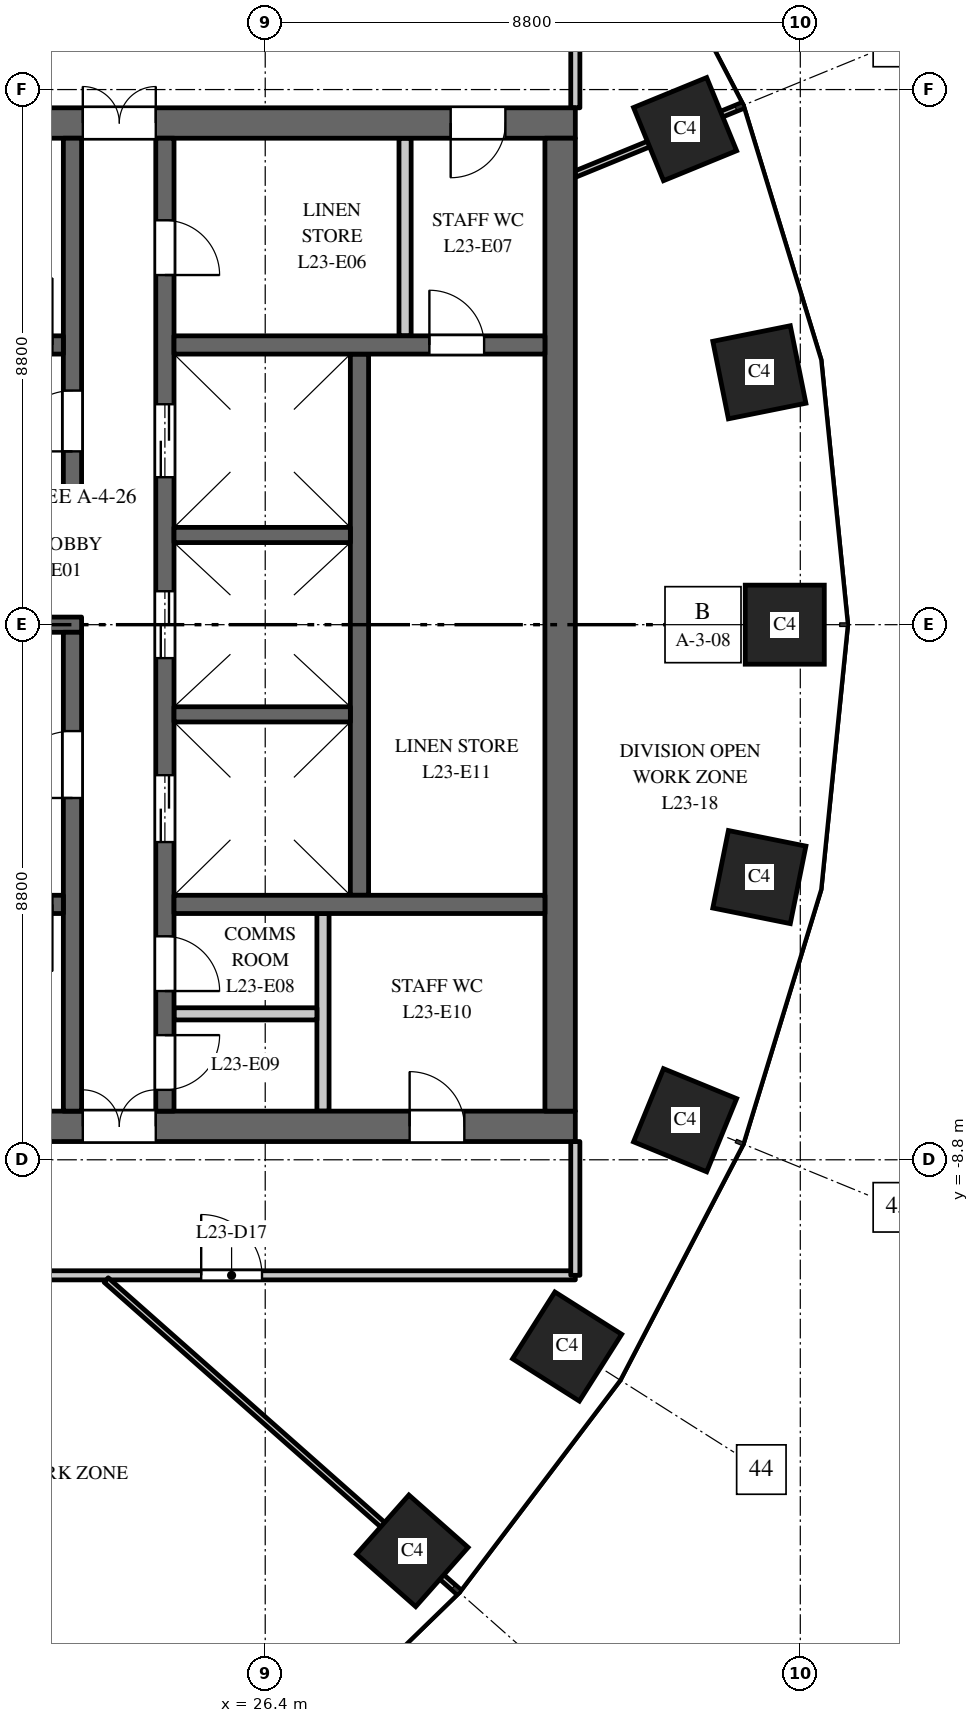
"""IFC4 building model, lengths in metres.
Left out: names, types, materials, properties, quantities, classifications, styles, units other than length and angle.
Written with IfcOpenShell. Run it as: python <this file> out.ifc"""

import sys

from ifc_helpers import new_model, si_unit, direction, frame, frame_2d, origin, origin_2d, place, context, subcontext, project, spatial, rectangle, extrude, element, fill, save


model = new_model("IFC4")
c1 = context("Model", 3, precision=1e-05, world=origin(), true_north=direction((0.0, 1.0)))
c2 = subcontext(c1, "Body", "Model", "MODEL_VIEW")
j1 = project(units=[si_unit("LENGTHUNIT", "METRE"), si_unit("PLANEANGLEUNIT", "RADIAN")], contexts=[c1])
p1 = place(None, origin())
s1 = spatial("IfcSite", under=j1, at=p1, CompositionType="ELEMENT")
p2 = place(p1, origin())
s2 = spatial("IfcBuilding", under=s1, at=p2, CompositionType="ELEMENT")
p3 = place(p2, frame((0.0, 0.0, 104.0)))
s3 = spatial("IfcBuildingStorey", under=s2, at=p3, CompositionType="ELEMENT", Elevation=104.0)
for number, where, z_axis, x_axis in (
    (1, (34.945, 0.0, 0.0), (0.0, 0.0, 1.0), (0.0, 1.0, 0.0)),
    (2, (34.527, 4.151, 0.0), (0.0, 0.0, 1.0), (-0.197, 0.98, 0.0)),
    (3, (33.305, 8.149, 0.0), (0.0, 0.0, 1.0), (-0.379, 0.925, 0.0)),
    (4, (28.819, -15.23, 0.0), (0.0, 0.0, 1.0), (0.663, 0.749, 0.0)),
    (5, (31.365, -11.871, 0.0), (0.0, 0.0, 1.0), (0.535, 0.845, 0.0)),
    (6, (33.305, -8.149, 0.0), (0.0, 0.0, 1.0), (0.379, 0.925, 0.0)),
    (7, (34.527, -4.151, 0.0), (0.0, 0.0, 1.0), (0.197, 0.98, 0.0)),
):
    element("IfcColumn", number, at=place(p3, frame(where, z_axis=z_axis, x_axis=x_axis)), inside=s3, PredefinedType="COLUMN", context=c2, shape_type="SweptSolid", body=[
        extrude(rectangle(XDim=1.3, YDim=1.3, at=origin_2d()), origin(), (0.0, 0.0, 1.0), 4.0),
    ])
p4 = place(p3, frame((16.5, 8.25, 0.0), z_axis=(0.0, 0.0, 1.0), x_axis=(1.0, 0.0, 0.0)))
e8 = element("IfcWall", 8, at=p4, inside=s3, PredefinedType="SHEAR", context=c2, shape_type="SweptSolid", body=[
    extrude(rectangle(XDim=15.0, YDim=0.5, at=frame_2d((7.5, 0.0))), origin(), (0.0, 0.0, 1.0), 3.7),
])
p5 = place(p4, frame((6.9, 0.0, 0.0)))
e9 = element("IfcOpeningElement", 9, at=p5, cuts=e8, PredefinedType="OPENING", context=c2, shape_type="SweptSolid", body=[
    extrude(rectangle(XDim=1.2, YDim=2.1, at=frame_2d((0.6, 1.05))), frame((0.0, 0.26, 0.0), z_axis=(0.0, -1.0, 0.0), x_axis=(1.0, 0.0, 0.0)), (0.0, 0.0, 1.0), 0.52),
])
p6 = place(p4, frame((12.95, 0.0, 0.0)))
e10 = element("IfcOpeningElement", 10, at=p6, cuts=e8, PredefinedType="OPENING", context=c2, shape_type="SweptSolid", body=[
    extrude(rectangle(XDim=0.9, YDim=2.1, at=frame_2d((0.45, 1.05))), frame((0.0, 0.26, 0.0), z_axis=(0.0, -1.0, 0.0), x_axis=(1.0, 0.0, 0.0)), (0.0, 0.0, 1.0), 0.52),
])
p7 = place(p3, frame((16.5, -8.25, 0.0), z_axis=(0.0, 0.0, 1.0), x_axis=(1.0, 0.0, 0.0)))
e11 = element("IfcWall", 11, at=p7, inside=s3, PredefinedType="SHEAR", context=c2, shape_type="SweptSolid", body=[
    extrude(rectangle(XDim=15.0, YDim=0.5, at=frame_2d((7.5, 0.0))), origin(), (0.0, 0.0, 1.0), 3.7),
])
p8 = place(p7, frame((6.9, 0.0, 0.0)))
e12 = element("IfcOpeningElement", 12, at=p8, cuts=e11, PredefinedType="OPENING", context=c2, shape_type="SweptSolid", body=[
    extrude(rectangle(XDim=1.2, YDim=2.1, at=frame_2d((0.6, 1.05))), frame((0.0, 0.26, 0.0), z_axis=(0.0, -1.0, 0.0), x_axis=(1.0, 0.0, 0.0)), (0.0, 0.0, 1.0), 0.52),
])
p9 = place(p7, frame((12.275, 0.0, 0.0)))
e13 = element("IfcOpeningElement", 13, at=p9, cuts=e11, PredefinedType="OPENING", context=c2, shape_type="SweptSolid", body=[
    extrude(rectangle(XDim=0.9, YDim=2.1, at=frame_2d((0.45, 1.05))), frame((0.0, 0.26, 0.0), z_axis=(0.0, -1.0, 0.0), x_axis=(1.0, 0.0, 0.0)), (0.0, 0.0, 1.0), 0.52),
])
p10 = place(p3, frame((27.95, -4.45, 0.0), z_axis=(0.0, 0.0, 1.0), x_axis=(0.0, 1.0, 0.0)))
e14 = element("IfcWall", 14, at=p10, inside=s3, PredefinedType="SHEAR", context=c2, shape_type="SweptSolid", body=[
    extrude(rectangle(XDim=8.9, YDim=0.3, at=frame_2d((4.45, 0.0))), origin(), (0.0, 0.0, 1.0), 3.7),
])
p11 = place(p3, frame((24.75, -8.0, 0.0), z_axis=(0.0, 0.0, 1.0), x_axis=(0.0, 1.0, 0.0)))
e15 = element("IfcWall", 15, at=p11, inside=s3, PredefinedType="SHEAR", context=c2, shape_type="SweptSolid", body=[
    extrude(rectangle(XDim=16.0, YDim=0.3, at=frame_2d((8.0, 0.0))), origin(), (0.0, 0.0, 1.0), 3.7),
])
p12 = place(p11, frame((4.425, 0.0, 0.0)))
e16 = element("IfcOpeningElement", 16, at=p12, cuts=e15, PredefinedType="OPENING", context=c2, shape_type="SweptSolid", body=[
    extrude(rectangle(XDim=1.1, YDim=2.1, at=frame_2d((0.55, 1.05))), frame((0.0, 0.16, 0.0), z_axis=(0.0, -1.0, 0.0), x_axis=(1.0, 0.0, 0.0)), (0.0, 0.0, 1.0), 0.32),
])
p13 = place(p11, frame((7.45, 0.0, 0.0)))
e17 = element("IfcOpeningElement", 17, at=p13, cuts=e15, PredefinedType="OPENING", context=c2, shape_type="SweptSolid", body=[
    extrude(rectangle(XDim=1.1, YDim=2.1, at=frame_2d((0.55, 1.05))), frame((0.0, 0.16, 0.0), z_axis=(0.0, -1.0, 0.0), x_axis=(1.0, 0.0, 0.0)), (0.0, 0.0, 1.0), 0.32),
])
p14 = place(p11, frame((10.425, 0.0, 0.0)))
e18 = element("IfcOpeningElement", 18, at=p14, cuts=e15, PredefinedType="OPENING", context=c2, shape_type="SweptSolid", body=[
    extrude(rectangle(XDim=1.2, YDim=2.1, at=frame_2d((0.6, 1.05))), frame((0.0, 0.16, 0.0), z_axis=(0.0, -1.0, 0.0), x_axis=(1.0, 0.0, 0.0)), (0.0, 0.0, 1.0), 0.32),
])
p15 = place(p11, frame((13.75, 0.0, 0.0)))
e19 = element("IfcOpeningElement", 19, at=p15, cuts=e15, PredefinedType="OPENING", context=c2, shape_type="SweptSolid", body=[
    extrude(rectangle(XDim=0.9, YDim=2.1, at=frame_2d((0.45, 1.05))), frame((0.0, 0.16, 0.0), z_axis=(0.0, -1.0, 0.0), x_axis=(1.0, 0.0, 0.0)), (0.0, 0.0, 1.0), 0.32),
])
p16 = place(p11, frame((1.975, 0.0, 0.0)))
e20 = element("IfcOpeningElement", 20, at=p16, cuts=e15, PredefinedType="OPENING", context=c2, shape_type="SweptSolid", body=[
    extrude(rectangle(XDim=0.9, YDim=2.1, at=frame_2d((0.45, 1.05))), frame((0.0, 0.16, 0.0), z_axis=(0.0, -1.0, 0.0), x_axis=(1.0, 0.0, 0.0)), (0.0, 0.0, 1.0), 0.32),
])
p17 = place(p11, frame((0.35, 0.0, 0.0)))
e21 = element("IfcOpeningElement", 21, at=p17, cuts=e15, PredefinedType="OPENING", context=c2, shape_type="SweptSolid", body=[
    extrude(rectangle(XDim=0.9, YDim=2.1, at=frame_2d((0.45, 1.05))), frame((0.0, 0.16, 0.0), z_axis=(0.0, -1.0, 0.0), x_axis=(1.0, 0.0, 0.0)), (0.0, 0.0, 1.0), 0.32),
])
p18 = place(p3, frame((20.1, 0.0, 0.0), z_axis=(0.0, 0.0, 1.0), x_axis=(1.0, 0.0, 0.0)))
e22 = element("IfcWall", 22, at=p18, inside=s3, PredefinedType="SHEAR", context=c2, shape_type="SweptSolid", body=[
    extrude(rectangle(XDim=3.28, YDim=0.25, at=frame_2d((1.64, 0.0))), origin(), (0.0, 0.0, 1.0), 3.7),
])
p19 = place(p3, frame((31.25, -8.0, 0.0), z_axis=(0.0, 0.0, 1.0), x_axis=(0.0, 1.0, 0.0)))
e23 = element("IfcWall", 23, at=p19, inside=s3, PredefinedType="SHEAR", context=c2, shape_type="SweptSolid", body=[
    extrude(rectangle(XDim=16.0, YDim=0.5, at=frame_2d((8.0, 0.0))), origin(), (0.0, 0.0, 1.0), 3.7),
])
p20 = place(p3, frame((24.9, 4.6, 0.0), z_axis=(0.0, 0.0, 1.0), x_axis=(1.0, 0.0, 0.0)))
e24 = element("IfcWall", 24, at=p20, inside=s3, PredefinedType="SHEAR", context=c2, shape_type="SweptSolid", body=[
    extrude(rectangle(XDim=6.1, YDim=0.3, at=frame_2d((3.05, 0.0))), origin(), (0.0, 0.0, 1.0), 3.7),
])
p21 = place(p20, frame((4.2, 0.0, 0.0)))
e25 = element("IfcOpeningElement", 25, at=p21, cuts=e24, PredefinedType="OPENING", context=c2, shape_type="SweptSolid", body=[
    extrude(rectangle(XDim=0.9, YDim=2.1, at=frame_2d((0.45, 1.05))), frame((0.0, 0.16, 0.0), z_axis=(0.0, -1.0, 0.0), x_axis=(1.0, 0.0, 0.0)), (0.0, 0.0, 1.0), 0.32),
])
for number, where, z_axis, x_axis in (
    (26, (28.7, 4.75, 0.0), (0.0, 0.0, 1.0), (0.0, 1.0, 0.0)),
    (27, (27.35, -8.0, 0.0), (0.0, 0.0, 1.0), (0.0, 1.0, 0.0)),
):
    element("IfcWall", number, at=place(p3, frame(where, z_axis=z_axis, x_axis=x_axis)), inside=s3, PredefinedType="PARTITIONING", context=c2, shape_type="SweptSolid", body=[
        extrude(rectangle(XDim=3.25, YDim=0.2, at=frame_2d((1.625, 0.0))), origin(), (0.0, 0.0, 1.0), 3.7),
    ])
p22 = place(p3, frame((24.9, -6.4, 0.0), z_axis=(0.0, 0.0, 1.0), x_axis=(1.0, 0.0, 0.0)))
e28 = element("IfcWall", 28, at=p22, inside=s3, PredefinedType="PARTITIONING", context=c2, shape_type="SweptSolid", body=[
    extrude(rectangle(XDim=2.35, YDim=0.2, at=frame_2d((1.175, 0.0))), origin(), (0.0, 0.0, 1.0), 3.7),
])
p23 = place(p3, frame((24.9, -4.6, 0.0), z_axis=(0.0, 0.0, 1.0), x_axis=(1.0, 0.0, 0.0)))
e29 = element("IfcWall", 29, at=p23, inside=s3, PredefinedType="SHEAR", context=c2, shape_type="SweptSolid", body=[
    extrude(rectangle(XDim=6.1, YDim=0.3, at=frame_2d((3.05, 0.0))), origin(), (0.0, 0.0, 1.0), 3.7),
])
for number, where, z_axis, x_axis in (
    (30, (24.9, -1.475, 0.0), (0.0, 0.0, 1.0), (1.0, 0.0, 0.0)),
    (31, (24.9, 1.475, 0.0), (0.0, 0.0, 1.0), (1.0, 0.0, 0.0)),
):
    element("IfcWall", number, at=place(p3, frame(where, z_axis=z_axis, x_axis=x_axis)), inside=s3, PredefinedType="SHEAR", context=c2, shape_type="SweptSolid", body=[
        extrude(rectangle(XDim=2.9, YDim=0.25, at=frame_2d((1.45, 0.0))), origin(), (0.0, 0.0, 1.0), 3.7),
    ])
p24 = place(p3, frame((23.23, 2.25, 0.0), z_axis=(0.0, 0.0, 1.0), x_axis=(0.0, 1.0, 0.0)))
e32 = element("IfcWall", 32, at=p24, inside=s3, PredefinedType="SHEAR", context=c2, shape_type="SweptSolid", body=[
    extrude(rectangle(XDim=5.75, YDim=0.3, at=frame_2d((2.875, 0.0))), origin(), (0.0, 0.0, 1.0), 3.7),
])
p25 = place(p24, frame((0.6, 0.0, 0.0)))
e33 = element("IfcOpeningElement", 33, at=p25, cuts=e32, PredefinedType="OPENING", context=c2, shape_type="SweptSolid", body=[
    extrude(rectangle(XDim=1.0, YDim=2.1, at=frame_2d((0.5, 1.05))), frame((0.0, 0.16, 0.0), z_axis=(0.0, -1.0, 0.0), x_axis=(1.0, 0.0, 0.0)), (0.0, 0.0, 1.0), 0.32),
])
p26 = place(p3, frame((23.23, -8.0, 0.0), z_axis=(0.0, 0.0, 1.0), x_axis=(0.0, 1.0, 0.0)))
e34 = element("IfcWall", 34, at=p26, inside=s3, PredefinedType="SHEAR", context=c2, shape_type="SweptSolid", body=[
    extrude(rectangle(XDim=7.875, YDim=0.3, at=frame_2d((3.938, 0.0))), origin(), (0.0, 0.0, 1.0), 3.7),
])
p27 = place(p26, frame((5.15, 0.0, 0.0)))
e35 = element("IfcOpeningElement", 35, at=p27, cuts=e34, PredefinedType="OPENING", context=c2, shape_type="SweptSolid", body=[
    extrude(rectangle(XDim=1.1, YDim=2.1, at=frame_2d((0.55, 1.05))), frame((0.0, 0.16, 0.0), z_axis=(0.0, -1.0, 0.0), x_axis=(1.0, 0.0, 0.0)), (0.0, 0.0, 1.0), 0.32),
])
p28 = place(p3, frame((16.9, 4.6, 0.0), z_axis=(0.0, 0.0, 1.0), x_axis=(1.0, 0.0, 0.0)))
e36 = element("IfcWall", 36, at=p28, inside=s3, PredefinedType="SHEAR", context=c2, shape_type="SweptSolid", body=[
    extrude(rectangle(XDim=6.18, YDim=0.3, at=frame_2d((3.09, 0.0))), origin(), (0.0, 0.0, 1.0), 3.7),
])
p29 = place(p28, frame((4.9, 0.0, 0.0)))
e37 = element("IfcOpeningElement", 37, at=p29, cuts=e36, PredefinedType="OPENING", context=c2, shape_type="SweptSolid", body=[
    extrude(rectangle(XDim=1.1, YDim=2.1, at=frame_2d((0.55, 1.05))), frame((0.0, 0.16, 0.0), z_axis=(0.0, -1.0, 0.0), x_axis=(1.0, 0.0, 0.0)), (0.0, 0.0, 1.0), 0.32),
])
p30 = place(p3, frame((16.9, -4.6, 0.0), z_axis=(0.0, 0.0, 1.0), x_axis=(1.0, 0.0, 0.0)))
e38 = element("IfcWall", 38, at=p30, inside=s3, PredefinedType="SHEAR", context=c2, shape_type="SweptSolid", body=[
    extrude(rectangle(XDim=6.18, YDim=0.3, at=frame_2d((3.09, 0.0))), origin(), (0.0, 0.0, 1.0), 3.7),
])
p31 = place(p30, frame((4.9, 0.0, 0.0)))
e39 = element("IfcOpeningElement", 39, at=p31, cuts=e38, PredefinedType="OPENING", context=c2, shape_type="SweptSolid", body=[
    extrude(rectangle(XDim=1.1, YDim=2.1, at=frame_2d((0.55, 1.05))), frame((0.0, 0.16, 0.0), z_axis=(0.0, -1.0, 0.0), x_axis=(1.0, 0.0, 0.0)), (0.0, 0.0, 1.0), 0.32),
])
p32 = place(p3, frame((20.85, 2.125, 0.0), z_axis=(0.0, 0.0, 1.0), x_axis=(1.0, 0.0, 0.0)))
e40 = element("IfcWall", 40, at=p32, inside=s3, PredefinedType="SHEAR", context=c2, shape_type="SweptSolid", body=[
    extrude(rectangle(XDim=2.53, YDim=0.25, at=frame_2d((1.265, 0.0))), origin(), (0.0, 0.0, 1.0), 3.7),
])
p33 = place(p3, frame((16.5, -10.7, 0.0), z_axis=(0.0, 0.0, 1.0), x_axis=(1.0, 0.0, 0.0)))
e41 = element("IfcWall", 41, at=p33, inside=s3, PredefinedType="PARTITIONING", context=c2, shape_type="SweptSolid", body=[
    extrude(rectangle(XDim=15.0, YDim=0.15, at=frame_2d((7.5, 0.0))), origin(), (0.0, 0.0, 1.0), 2.75),
])
p34 = place(p33, frame((0.65, 0.0, 0.0)))
e42 = element("IfcOpeningElement", 42, at=p34, cuts=e41, PredefinedType="OPENING", context=c2, shape_type="SweptSolid", body=[
    extrude(rectangle(XDim=1.0, YDim=2.1, at=frame_2d((0.5, 1.05))), frame((0.0, 0.085, 0.0), z_axis=(0.0, -1.0, 0.0), x_axis=(1.0, 0.0, 0.0)), (0.0, 0.0, 1.0), 0.17),
])
p35 = place(p33, frame((8.847, 0.0, 0.0)))
e43 = element("IfcOpeningElement", 43, at=p35, cuts=e41, PredefinedType="OPENING", context=c2, shape_type="SweptSolid", body=[
    extrude(rectangle(XDim=1.0, YDim=2.1, at=frame_2d((0.5, 1.05))), frame((0.0, 0.085, 0.0), z_axis=(0.0, -1.0, 0.0), x_axis=(1.0, 0.0, 0.0)), (0.0, 0.0, 1.0), 0.17),
])
p36 = place(p3, frame((23.785, -10.778, 0.0), z_axis=(0.0, 0.0, 1.0), x_axis=(0.748985701008, -0.662586160198, 0.0)))
e44 = element("IfcWall", 44, at=p36, inside=s3, PredefinedType="PARTITIONING", context=c2, shape_type="SweptSolid", body=[
    extrude(rectangle(XDim=7.723, YDim=0.1, at=frame_2d((3.861, 0.0))), origin(), (0.0, 0.0, 1.0), 3.7),
])
p37 = place(p3, frame((31.5, -10.7, 0.0), z_axis=(0.0, 0.0, 1.0), x_axis=(0.0, 1.0, 0.0)))
e45 = element("IfcWall", 45, at=p37, inside=s3, PredefinedType="PARTITIONING", context=c2, shape_type="SweptSolid", body=[
    extrude(rectangle(XDim=2.2, YDim=0.15, at=frame_2d((1.1, 0.0))), origin(), (0.0, 0.0, 1.0), 2.9),
])
p38 = place(p3, frame((31.5, 7.41, 0.0), z_axis=(0.0, 0.0, 1.0), x_axis=(0.925344112436, 0.379128307542, 0.0)))
e46 = element("IfcWall", 46, at=p38, inside=s3, PredefinedType="PARTITIONING", context=c2, shape_type="SweptSolid", body=[
    extrude(rectangle(XDim=2.954, YDim=0.1, at=frame_2d((1.477, 0.0))), origin(), (0.0, 0.0, 1.0), 3.7),
])
p39 = place(p3, frame((31.5, 8.5, 0.0), z_axis=(0.0, 0.0, 1.0), x_axis=(0.0, 1.0, 0.0)))
e47 = element("IfcWall", 47, at=p39, inside=s3, PredefinedType="PARTITIONING", context=c2, shape_type="SweptSolid", body=[
    extrude(rectangle(XDim=2.2, YDim=0.15, at=frame_2d((1.1, 0.0))), origin(), (0.0, 0.0, 1.0), 2.9),
])
p40 = place(p12, origin())
e48 = element("IfcDoor", 48, at=p40, inside=s3, OperationType="DOUBLE_DOOR_SLIDING", PredefinedType="DOOR", context=c2, shape_type="SweptSolid", body=[
    extrude(rectangle(XDim=1.1, YDim=2.1, at=frame_2d((0.55, 1.05))), frame((0.0, 0.025, 0.0), z_axis=(0.0, -1.0, 0.0), x_axis=(1.0, 0.0, 0.0)), (0.0, 0.0, 1.0), 0.05),
])
fill(e16, e48)
p41 = place(p13, origin())
e49 = element("IfcDoor", 49, at=p41, inside=s3, OperationType="DOUBLE_DOOR_SLIDING", PredefinedType="DOOR", context=c2, shape_type="SweptSolid", body=[
    extrude(rectangle(XDim=1.1, YDim=2.1, at=frame_2d((0.55, 1.05))), frame((0.0, 0.025, 0.0), z_axis=(0.0, -1.0, 0.0), x_axis=(1.0, 0.0, 0.0)), (0.0, 0.0, 1.0), 0.05),
])
fill(e17, e49)
p42 = place(p14, origin())
e50 = element("IfcDoor", 50, at=p42, inside=s3, OperationType="DOUBLE_DOOR_SLIDING", PredefinedType="DOOR", context=c2, shape_type="SweptSolid", body=[
    extrude(rectangle(XDim=1.2, YDim=2.1, at=frame_2d((0.6, 1.05))), frame((0.0, 0.025, 0.0), z_axis=(0.0, -1.0, 0.0), x_axis=(1.0, 0.0, 0.0)), (0.0, 0.0, 1.0), 0.05),
])
fill(e18, e50)
p43 = place(p29, origin())
e51 = element("IfcDoor", 51, at=p43, inside=s3, OperationType="SINGLE_SWING_LEFT", PredefinedType="DOOR", context=c2, shape_type="SweptSolid", body=[
    extrude(rectangle(XDim=1.1, YDim=2.1, at=frame_2d((0.55, 1.05))), frame((0.0, 0.025, 0.0), z_axis=(0.0, -1.0, 0.0), x_axis=(1.0, 0.0, 0.0)), (0.0, 0.0, 1.0), 0.05),
])
fill(e37, e51)
p44 = place(p31, origin())
e52 = element("IfcDoor", 52, at=p44, inside=s3, OperationType="SINGLE_SWING_RIGHT", PredefinedType="DOOR", context=c2, shape_type="SweptSolid", body=[
    extrude(rectangle(XDim=1.1, YDim=2.1, at=frame_2d((0.55, 1.05))), frame((0.0, 0.025, 0.0), z_axis=(0.0, -1.0, 0.0), x_axis=(1.0, 0.0, 0.0)), (0.0, 0.0, 1.0), 0.05),
])
fill(e39, e52)
p45 = place(p27, origin())
e53 = element("IfcDoor", 53, at=p45, inside=s3, OperationType="SINGLE_SWING_RIGHT", PredefinedType="DOOR", context=c2, shape_type="SweptSolid", body=[
    extrude(rectangle(XDim=1.1, YDim=2.1, at=frame_2d((0.55, 1.05))), frame((0.0, 0.025, 0.0), z_axis=(0.0, -1.0, 0.0), x_axis=(1.0, 0.0, 0.0)), (0.0, 0.0, 1.0), 0.05),
])
fill(e35, e53)
p46 = place(p25, origin())
e54 = element("IfcDoor", 54, at=p46, inside=s3, OperationType="SINGLE_SWING_RIGHT", PredefinedType="DOOR", context=c2, shape_type="SweptSolid", body=[
    extrude(rectangle(XDim=1.0, YDim=2.1, at=frame_2d((0.5, 1.05))), frame((0.0, 0.025, 0.0), z_axis=(0.0, -1.0, 0.0), x_axis=(1.0, 0.0, 0.0)), (0.0, 0.0, 1.0), 0.05),
])
fill(e33, e54)
p47 = place(p5, origin())
e55 = element("IfcDoor", 55, at=p47, inside=s3, OperationType="DOUBLE_DOOR_DOUBLE_SWING", PredefinedType="DOOR", context=c2, shape_type="SweptSolid", body=[
    extrude(rectangle(XDim=1.2, YDim=2.1, at=frame_2d((0.6, 1.05))), frame((0.0, 0.025, 0.0), z_axis=(0.0, -1.0, 0.0), x_axis=(1.0, 0.0, 0.0)), (0.0, 0.0, 1.0), 0.05),
])
fill(e9, e55)
p48 = place(p8, origin())
e56 = element("IfcDoor", 56, at=p48, inside=s3, OperationType="DOUBLE_DOOR_DOUBLE_SWING", PredefinedType="DOOR", context=c2, shape_type="SweptSolid", body=[
    extrude(rectangle(XDim=1.2, YDim=2.1, at=frame_2d((0.6, 1.05))), frame((0.0, 0.025, 0.0), z_axis=(0.0, -1.0, 0.0), x_axis=(1.0, 0.0, 0.0)), (0.0, 0.0, 1.0), 0.05),
])
fill(e12, e56)
p49 = place(p15, origin())
e57 = element("IfcDoor", 57, at=p49, inside=s3, OperationType="SINGLE_SWING_LEFT", PredefinedType="DOOR", context=c2, shape_type="SweptSolid", body=[
    extrude(rectangle(XDim=0.9, YDim=2.1, at=frame_2d((0.45, 1.05))), frame((0.0, 0.025, 0.0), z_axis=(0.0, -1.0, 0.0), x_axis=(1.0, 0.0, 0.0)), (0.0, 0.0, 1.0), 0.05),
])
fill(e19, e57)
p50 = place(p6, origin())
e58 = element("IfcDoor", 58, at=p50, inside=s3, OperationType="SINGLE_SWING_LEFT", PredefinedType="DOOR", context=c2, shape_type="SweptSolid", body=[
    extrude(rectangle(XDim=0.9, YDim=2.1, at=frame_2d((0.45, 1.05))), frame((0.0, 0.025, 0.0), z_axis=(0.0, -1.0, 0.0), x_axis=(1.0, 0.0, 0.0)), (0.0, 0.0, 1.0), 0.05),
])
fill(e10, e58)
p51 = place(p16, origin())
e59 = element("IfcDoor", 59, at=p51, inside=s3, OperationType="SINGLE_SWING_LEFT", PredefinedType="DOOR", context=c2, shape_type="SweptSolid", body=[
    extrude(rectangle(XDim=0.9, YDim=2.1, at=frame_2d((0.45, 1.05))), frame((0.0, 0.025, 0.0), z_axis=(0.0, -1.0, 0.0), x_axis=(1.0, 0.0, 0.0)), (0.0, 0.0, 1.0), 0.05),
])
fill(e20, e59)
p52 = place(p17, origin())
e60 = element("IfcDoor", 60, at=p52, inside=s3, OperationType="SINGLE_SWING_RIGHT", PredefinedType="DOOR", context=c2, shape_type="SweptSolid", body=[
    extrude(rectangle(XDim=0.9, YDim=2.1, at=frame_2d((0.45, 1.05))), frame((0.0, 0.025, 0.0), z_axis=(0.0, -1.0, 0.0), x_axis=(1.0, 0.0, 0.0)), (0.0, 0.0, 1.0), 0.05),
])
fill(e21, e60)
p53 = place(p9, origin())
e61 = element("IfcDoor", 61, at=p53, inside=s3, OperationType="SINGLE_SWING_RIGHT", PredefinedType="DOOR", context=c2, shape_type="SweptSolid", body=[
    extrude(rectangle(XDim=0.9, YDim=2.1, at=frame_2d((0.45, 1.05))), frame((0.0, 0.025, 0.0), z_axis=(0.0, -1.0, 0.0), x_axis=(1.0, 0.0, 0.0)), (0.0, 0.0, 1.0), 0.05),
])
fill(e13, e61)
p54 = place(p21, origin())
e62 = element("IfcDoor", 62, at=p54, inside=s3, OperationType="SINGLE_SWING_RIGHT", PredefinedType="DOOR", context=c2, shape_type="SweptSolid", body=[
    extrude(rectangle(XDim=0.9, YDim=2.1, at=frame_2d((0.45, 1.05))), frame((0.0, 0.025, 0.0), z_axis=(0.0, -1.0, 0.0), x_axis=(1.0, 0.0, 0.0)), (0.0, 0.0, 1.0), 0.05),
])
fill(e25, e62)
p55 = place(p35, origin())
e63 = element("IfcDoor", 63, at=p55, inside=s3, OperationType="SINGLE_SWING_LEFT", PredefinedType="DOOR", context=c2, shape_type="SweptSolid", body=[
    extrude(rectangle(XDim=1.0, YDim=2.1, at=frame_2d((0.5, 1.05))), frame((0.0, 0.025, 0.0), z_axis=(0.0, -1.0, 0.0), x_axis=(1.0, 0.0, 0.0)), (0.0, 0.0, 1.0), 0.05),
])
fill(e43, e63)
save(model, sys.argv[1])
